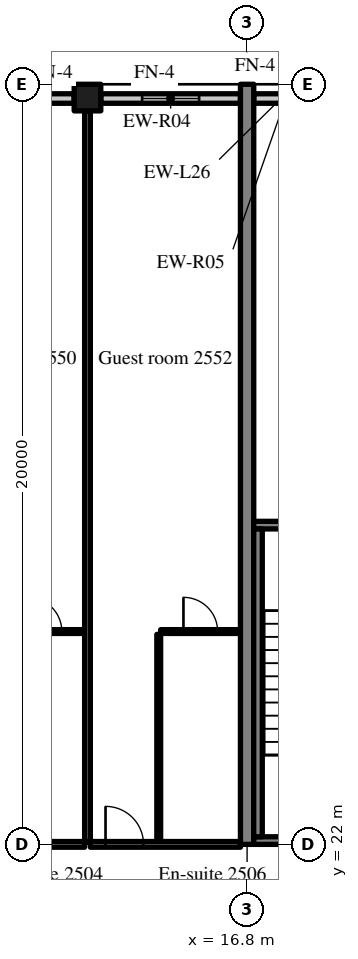
"""IFC4 building model, lengths in metres.
Left out: names, types, materials, properties, quantities, classifications, styles, units other than length and angle.
Written with IfcOpenShell. Run it as: python <this file> out.ifc"""

import sys

from ifc_helpers import new_model, si_unit, direction, frame, frame_2d, origin, origin_2d, place, context, subcontext, project, spatial, rectangle, extrude, source, transform, mapped, element, fill, save


model = new_model("IFC4")
c1 = context("Model", 3, precision=1e-05, world=origin(), true_north=direction((0.0, 1.0)))
c2 = subcontext(c1, "Body", "Model", "MODEL_VIEW")
j1 = project(units=[si_unit("LENGTHUNIT", "METRE"), si_unit("PLANEANGLEUNIT", "RADIAN")], contexts=[c1])
p1 = place(None, origin())
s1 = spatial("IfcSite", under=j1, at=p1, CompositionType="ELEMENT")
p2 = place(p1, origin())
s2 = spatial("IfcBuilding", under=s1, at=p2, CompositionType="ELEMENT")
p3 = place(p2, frame((0.0, 0.0, 106.6)))
s3 = spatial("IfcBuildingStorey", under=s2, at=p3, CompositionType="ELEMENT", Elevation=106.6)
m1 = source(origin(), c2, "Body", "SweptSolid", [
    extrude(rectangle(XDim=20.0, YDim=0.35, at=frame_2d((10.0, 0.0))), origin(), (0.0, 0.0, 1.0), 3.52),
])
p4 = place(p3, frame((16.8, 22.0, 0.0), z_axis=(0.0, 0.0, 1.0), x_axis=(0.0, 1.0, 0.0)))
e1 = element("IfcWall", 1, at=p4, inside=s3, PredefinedType="SHEAR", context=c2, shape_type="MappedRepresentation", body=[
    mapped(m1, transform((0.0, 0.0, 0.0), scale=1.0)),
])
m2 = source(origin(), c2, "Body", "SweptSolid", [
    extrude(rectangle(XDim=0.7, YDim=0.7, at=origin_2d()), origin(), (0.0, 0.0, 1.0), 3.52),
])
p5 = place(p3, frame((12.6, 41.65, 0.0), z_axis=(0.0, 0.0, 1.0), x_axis=(1.0, 0.0, 0.0)))
e2 = element("IfcColumn", 2, at=p5, inside=s3, PredefinedType="COLUMN", context=c2, shape_type="MappedRepresentation", body=[
    mapped(m2, transform((0.0, 0.0, 0.0), scale=1.0)),
])
m3 = source(origin(), c2, "Body", "SweptSolid", [
    extrude(rectangle(XDim=3.675, YDim=0.25, at=frame_2d((1.837, 0.0))), origin(), (0.0, 0.0, 1.0), 2.82),
])
p6 = place(p3, frame((12.25, 41.625, 0.0), z_axis=(0.0, 0.0, 1.0), x_axis=(-1.0, 0.0, 0.0)))
e3 = element("IfcWall", 3, at=p6, inside=s3, PredefinedType="SOLIDWALL", context=c2, shape_type="MappedRepresentation", body=[
    mapped(m3, transform((0.0, 0.0, 0.0), scale=1.0)),
])
m4 = source(origin(), c2, "Body", "SweptSolid", [
    extrude(rectangle(XDim=1.5, YDim=1.5, at=frame_2d((0.75, 0.75))), frame((0.0, 0.135, 0.0), z_axis=(0.0, -1.0, 0.0), x_axis=(1.0, 0.0, 0.0)), (0.0, 0.0, 1.0), 0.27),
])
p7 = place(p6, frame((1.087, 0.0, 0.9)))
e4 = element("IfcOpeningElement", 4, at=p7, cuts=e3, PredefinedType="OPENING", context=c2, shape_type="MappedRepresentation", body=[
    mapped(m4, transform((0.0, 0.0, 0.0), scale=1.0)),
])
p8 = place(p3, frame((16.625, 41.625, 0.0), z_axis=(0.0, 0.0, 1.0), x_axis=(-1.0, 0.0, 0.0)))
e5 = element("IfcWall", 5, at=p8, inside=s3, PredefinedType="SOLIDWALL", context=c2, shape_type="MappedRepresentation", body=[
    mapped(m3, transform((0.0, 0.0, 0.0), scale=1.0)),
])
p9 = place(p8, frame((1.087, 0.0, 0.9)))
e6 = element("IfcOpeningElement", 6, at=p9, cuts=e5, PredefinedType="OPENING", context=c2, shape_type="MappedRepresentation", body=[
    mapped(m4, transform((0.0, 0.0, 0.0), scale=1.0)),
])
m5 = source(origin(), c2, "Body", "SweptSolid", [
    extrude(rectangle(XDim=1.683, YDim=0.25, at=frame_2d((0.841, 0.0))), origin(), (0.0, 0.0, 1.0), 2.82),
])
p10 = place(p3, frame((18.658, 41.625, 0.0), z_axis=(0.0, 0.0, 1.0), x_axis=(-1.0, 0.0, 0.0)))
e7 = element("IfcWall", 7, at=p10, inside=s3, PredefinedType="SOLIDWALL", context=c2, shape_type="MappedRepresentation", body=[
    mapped(m5, transform((0.0, 0.0, 0.0), scale=1.0)),
])
m6 = source(origin(), c2, "Body", "SweptSolid", [
    extrude(rectangle(XDim=8.225, YDim=0.2, at=frame_2d((4.112, 0.0))), origin(), (0.0, 0.0, 1.0), 3.52),
])
p11 = place(p3, frame((16.975, 22.1, 0.0), z_axis=(0.0, 0.0, 1.0), x_axis=(1.0, 0.0, 0.0)))
e8 = element("IfcWall", 8, at=p11, inside=s3, PredefinedType="SOLIDWALL", context=c2, shape_type="MappedRepresentation", body=[
    mapped(m6, transform((0.0, 0.0, 0.0), scale=1.0)),
])
m7 = source(origin(), c2, "Body", "SweptSolid", [
    extrude(rectangle(XDim=1.2, YDim=2.1, at=frame_2d((0.6, 1.05))), frame((0.0, 0.11, 0.0), z_axis=(0.0, -1.0, 0.0), x_axis=(1.0, 0.0, 0.0)), (0.0, 0.0, 1.0), 0.22),
])
p12 = place(p11, frame((6.025, 0.0, 0.0)))
e9 = element("IfcOpeningElement", 9, at=p12, cuts=e8, PredefinedType="OPENING", context=c2, shape_type="MappedRepresentation", body=[
    mapped(m7, transform((0.0, 0.0, 0.0), scale=1.0)),
])
p13 = place(p3, frame((16.975, 30.4, 0.0), z_axis=(0.0, 0.0, 1.0), x_axis=(1.0, 0.0, 0.0)))
e10 = element("IfcWall", 10, at=p13, inside=s3, PredefinedType="SOLIDWALL", context=c2, shape_type="MappedRepresentation", body=[
    mapped(m6, transform((0.0, 0.0, 0.0), scale=1.0)),
])
m8 = source(origin(), c2, "Body", "SweptSolid", [
    extrude(rectangle(XDim=1.0, YDim=2.1, at=frame_2d((0.5, 1.05))), frame((0.0, 0.11, 0.0), z_axis=(0.0, -1.0, 0.0), x_axis=(1.0, 0.0, 0.0)), (0.0, 0.0, 1.0), 0.22),
])
p14 = place(p13, frame((6.125, 0.0, 0.0)))
e11 = element("IfcOpeningElement", 11, at=p14, cuts=e10, PredefinedType="OPENING", context=c2, shape_type="MappedRepresentation", body=[
    mapped(m8, transform((0.0, 0.0, 0.0), scale=1.0)),
])
m9 = source(origin(), c2, "Body", "SweptSolid", [
    extrude(rectangle(XDim=8.1, YDim=0.225, at=frame_2d((4.05, 0.0))), origin(), (0.0, 0.0, 1.0), 3.52),
])
p15 = place(p3, frame((17.087, 22.2, 0.0), z_axis=(0.0, 0.0, 1.0), x_axis=(0.0, 1.0, 0.0)))
e12 = element("IfcWall", 12, at=p15, inside=s3, PredefinedType="SOLIDWALL", context=c2, shape_type="MappedRepresentation", body=[
    mapped(m9, transform((0.0, 0.0, 0.0), scale=1.0)),
])
m10 = source(origin(), c2, "Body", "SweptSolid", [
    extrude(rectangle(XDim=2.1, YDim=0.1, at=frame_2d((1.05, 0.0))), origin(), (0.0, 0.0, 1.0), 3.52),
])
p16 = place(p3, frame((10.425, 27.6, 0.0), z_axis=(0.0, 0.0, 1.0), x_axis=(1.0, 0.0, 0.0)))
e13 = element("IfcWall", 13, at=p16, inside=s3, PredefinedType="PARTITIONING", context=c2, shape_type="MappedRepresentation", body=[
    mapped(m10, transform((0.0, 0.0, 0.0), scale=1.0)),
])
m11 = source(origin(), c2, "Body", "SweptSolid", [
    extrude(rectangle(XDim=0.9, YDim=2.1, at=frame_2d((0.45, 1.05))), frame((0.0, 0.06, 0.0), z_axis=(0.0, -1.0, 0.0), x_axis=(1.0, 0.0, 0.0)), (0.0, 0.0, 1.0), 0.12),
])
p17 = place(p16, frame((0.6, 0.0, 0.0)))
e14 = element("IfcOpeningElement", 14, at=p17, cuts=e13, PredefinedType="OPENING", context=c2, shape_type="MappedRepresentation", body=[
    mapped(m11, transform((0.0, 0.0, 0.0), scale=1.0)),
])
m12 = source(origin(), c2, "Body", "SweptSolid", [
    extrude(rectangle(XDim=3.95, YDim=0.15, at=frame_2d((1.975, 0.0))), origin(), (0.0, 0.0, 1.0), 2.82),
])
p18 = place(p3, frame((8.575, 22.0, 0.0), z_axis=(0.0, 0.0, 1.0), x_axis=(1.0, 0.0, 0.0)))
e15 = element("IfcWall", 15, at=p18, inside=s3, PredefinedType="PARTITIONING", context=c2, shape_type="MappedRepresentation", body=[
    mapped(m12, transform((0.0, 0.0, 0.0), scale=1.0)),
])
m13 = source(origin(), c2, "Body", "SweptSolid", [
    extrude(rectangle(XDim=1.0, YDim=2.1, at=frame_2d((0.5, 1.05))), frame((0.0, 0.085, 0.0), z_axis=(0.0, -1.0, 0.0), x_axis=(1.0, 0.0, 0.0)), (0.0, 0.0, 1.0), 0.17),
])
p19 = place(p18, frame((0.4, 0.0, 0.0)))
e16 = element("IfcOpeningElement", 16, at=p19, cuts=e15, PredefinedType="OPENING", context=c2, shape_type="MappedRepresentation", body=[
    mapped(m13, transform((0.0, 0.0, 0.0), scale=1.0)),
])
m14 = source(origin(), c2, "Body", "SweptSolid", [
    extrude(rectangle(XDim=5.45, YDim=0.1, at=frame_2d((2.725, 0.0))), origin(), (0.0, 0.0, 1.0), 3.52),
])
p20 = place(p3, frame((14.475, 22.075, 0.0), z_axis=(0.0, 0.0, 1.0), x_axis=(0.0, 1.0, 0.0)))
e17 = element("IfcWall", 17, at=p20, inside=s3, PredefinedType="PARTITIONING", context=c2, shape_type="MappedRepresentation", body=[
    mapped(m14, transform((0.0, 0.0, 0.0), scale=1.0)),
])
m15 = source(origin(), c2, "Body", "SweptSolid", [
    extrude(rectangle(XDim=2.1, YDim=0.1, at=frame_2d((1.05, 0.0))), origin(), (0.0, 0.0, 1.0), 3.52),
])
p21 = place(p3, frame((14.525, 27.6, 0.0), z_axis=(0.0, 0.0, 1.0), x_axis=(1.0, 0.0, 0.0)))
e18 = element("IfcWall", 18, at=p21, inside=s3, PredefinedType="PARTITIONING", context=c2, shape_type="MappedRepresentation", body=[
    mapped(m15, transform((0.0, 0.0, 0.0), scale=1.0)),
])
p22 = place(p21, frame((0.6, 0.0, 0.0)))
e19 = element("IfcOpeningElement", 19, at=p22, cuts=e18, PredefinedType="OPENING", context=c2, shape_type="MappedRepresentation", body=[
    mapped(m11, transform((0.0, 0.0, 0.0), scale=1.0)),
])
p23 = place(p3, frame((12.675, 22.0, 0.0), z_axis=(0.0, 0.0, 1.0), x_axis=(1.0, 0.0, 0.0)))
e20 = element("IfcWall", 20, at=p23, inside=s3, PredefinedType="PARTITIONING", context=c2, shape_type="MappedRepresentation", body=[
    mapped(m12, transform((0.0, 0.0, 0.0), scale=1.0)),
])
p24 = place(p23, frame((0.4, 0.0, 0.0)))
e21 = element("IfcOpeningElement", 21, at=p24, cuts=e20, PredefinedType="OPENING", context=c2, shape_type="MappedRepresentation", body=[
    mapped(m13, transform((0.0, 0.0, 0.0), scale=1.0)),
])
m16 = source(origin(), c2, "Body", "SweptSolid", [
    extrude(rectangle(XDim=19.225, YDim=0.15, at=frame_2d((9.613, 0.0))), origin(), (0.0, 0.0, 1.0), 3.52),
])
p25 = place(p3, frame((12.6, 22.075, 0.0), z_axis=(0.0, 0.0, 1.0), x_axis=(0.0, 1.0, 0.0)))
e22 = element("IfcWall", 22, at=p25, inside=s3, PredefinedType="PARTITIONING", context=c2, shape_type="MappedRepresentation", body=[
    mapped(m16, transform((0.0, 0.0, 0.0), scale=1.0)),
])
m17 = source(origin(), c2, "Body", "SweptSolid", [
    extrude(rectangle(XDim=1.5, YDim=1.5, at=frame_2d((0.75, 0.75))), frame((0.0, 0.03, 0.0), z_axis=(0.0, -1.0, 0.0), x_axis=(1.0, 0.0, 0.0)), (0.0, 0.0, 1.0), 0.06),
])
p26 = place(p9, origin())
e23 = element("IfcWindow", 23, at=p26, inside=s3, PartitioningType="SINGLE_PANEL", PredefinedType="WINDOW", context=c2, shape_type="MappedRepresentation", body=[
    mapped(m17, transform((0.0, 0.0, 0.0), scale=1.0)),
])
fill(e6, e23)
m18 = source(origin(), c2, "Body", "SweptSolid", [
    extrude(rectangle(XDim=0.9, YDim=2.1, at=frame_2d((0.45, 1.05))), frame((0.0, 0.025, 0.0), z_axis=(0.0, -1.0, 0.0), x_axis=(1.0, 0.0, 0.0)), (0.0, 0.0, 1.0), 0.05),
])
p27 = place(p17, origin())
e24 = element("IfcDoor", 24, at=p27, inside=s3, OperationType="SINGLE_SWING_LEFT", PredefinedType="DOOR", context=c2, shape_type="MappedRepresentation", body=[
    mapped(m18, transform((0.0, 0.0, 0.0), scale=1.0)),
])
fill(e14, e24)
p28 = place(p22, origin())
e25 = element("IfcDoor", 25, at=p28, inside=s3, OperationType="SINGLE_SWING_LEFT", PredefinedType="DOOR", context=c2, shape_type="MappedRepresentation", body=[
    mapped(m18, transform((0.0, 0.0, 0.0), scale=1.0)),
])
fill(e19, e25)
m19 = source(origin(), c2, "Body", "SweptSolid", [
    extrude(rectangle(XDim=1.0, YDim=2.1, at=frame_2d((0.5, 1.05))), frame((0.0, 0.025, 0.0), z_axis=(0.0, -1.0, 0.0), x_axis=(1.0, 0.0, 0.0)), (0.0, 0.0, 1.0), 0.05),
])
p29 = place(p24, origin())
e26 = element("IfcDoor", 26, at=p29, inside=s3, OperationType="SINGLE_SWING_LEFT", PredefinedType="DOOR", context=c2, shape_type="MappedRepresentation", body=[
    mapped(m19, transform((0.0, 0.0, 0.0), scale=1.0)),
])
fill(e21, e26)
save(model, sys.argv[1])
